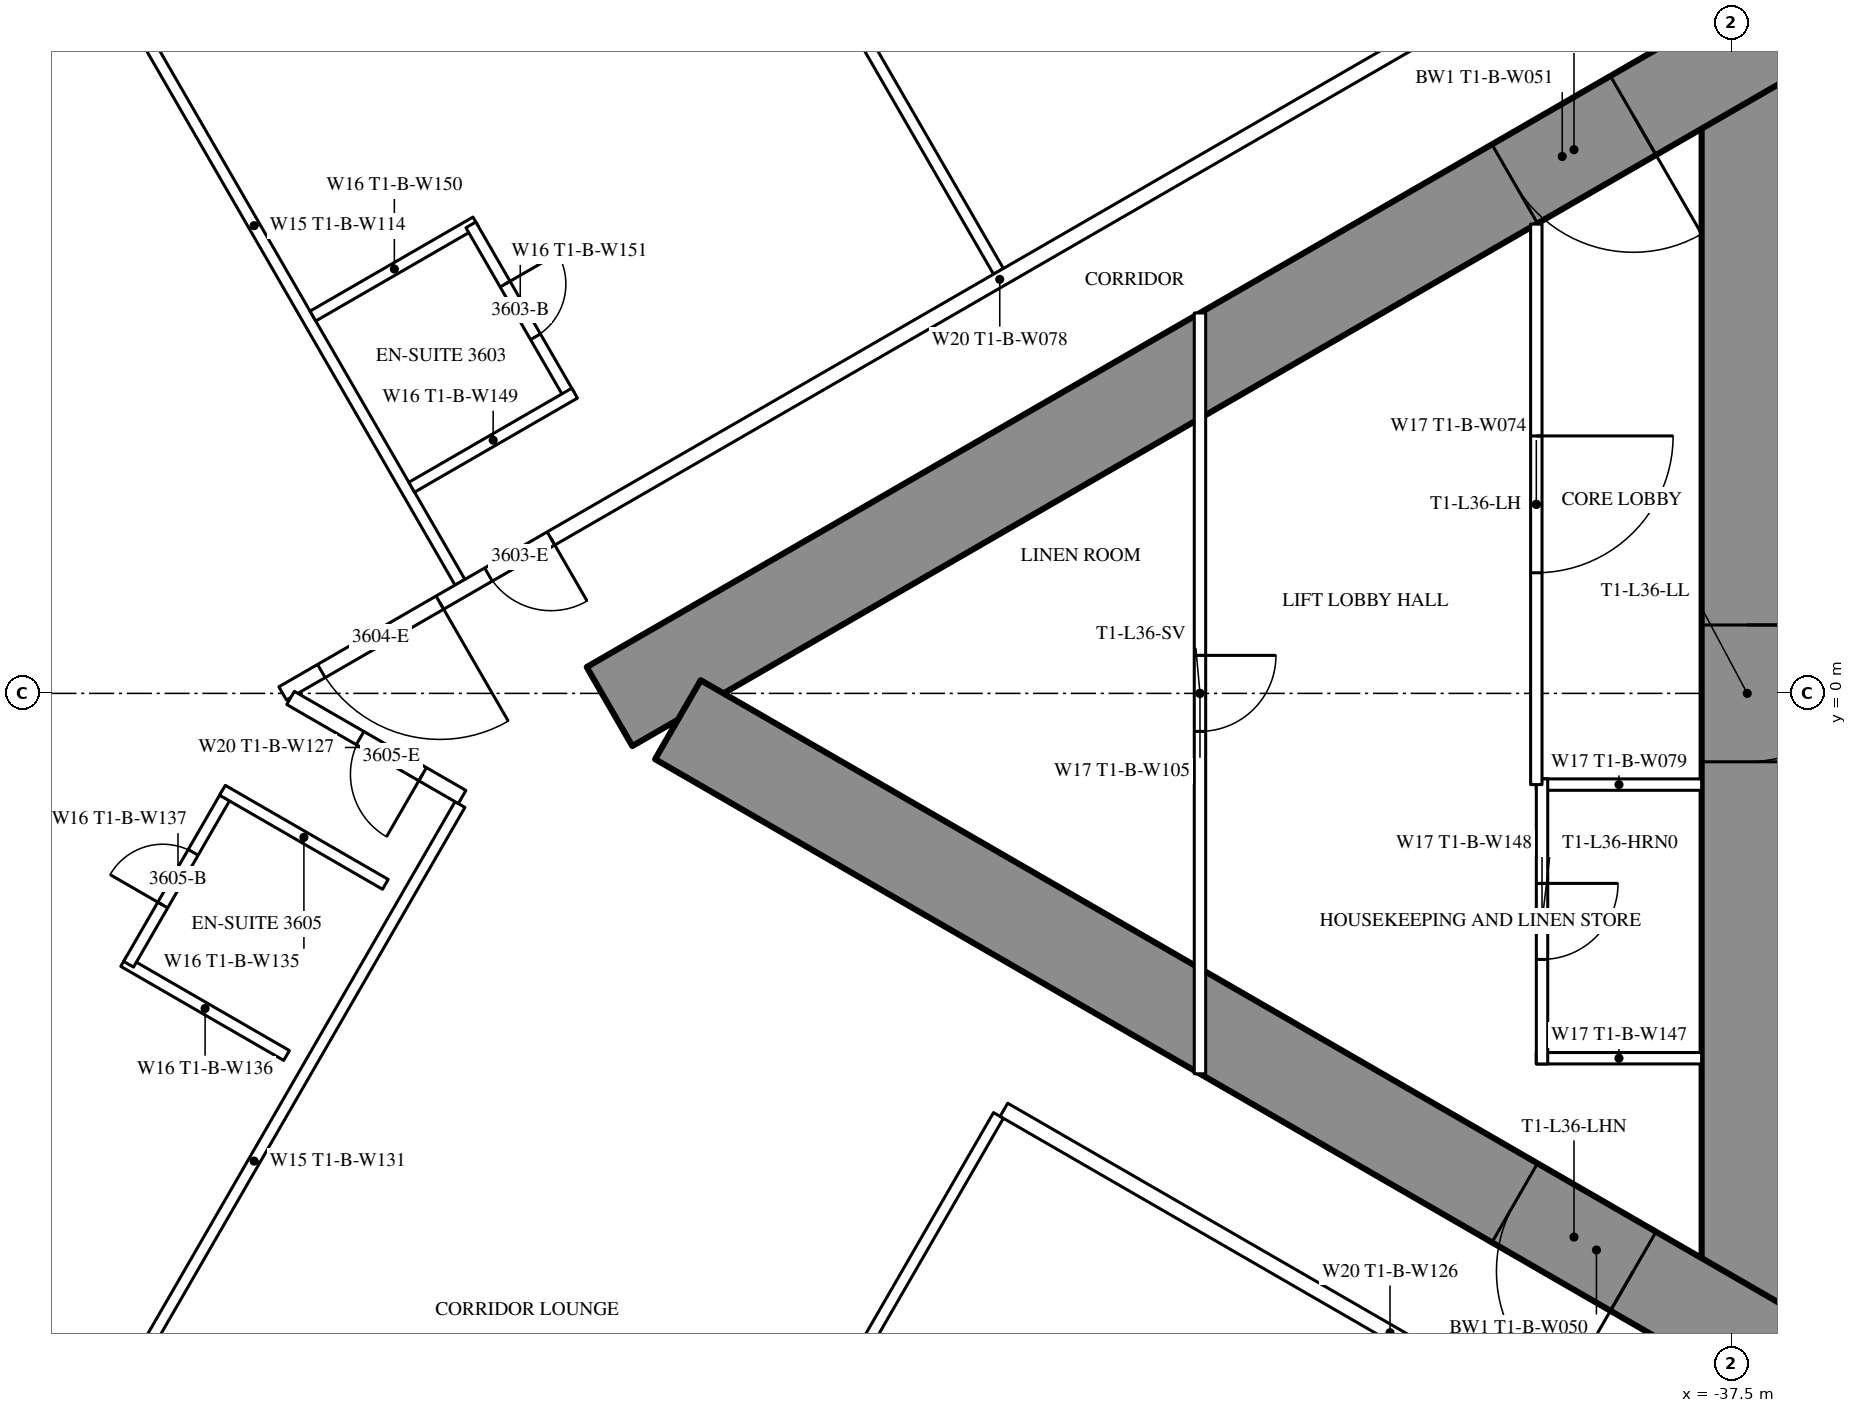
"""IFC4 building model, lengths in metres.
Left out: names, types, materials, properties, quantities, classifications, styles, units other than length and angle.
Written with IfcOpenShell. Run it as: python <this file> out.ifc"""

import sys

from ifc_helpers import new_model, si_unit, direction, frame, frame_2d, origin, place, context, subcontext, project, spatial, rectangle, extrude, element, fill, save


model = new_model("IFC4")
c1 = context("Model", 3, precision=1e-05, world=origin(), true_north=direction((0.0, 1.0)))
c2 = subcontext(c1, "Body", "Model", "MODEL_VIEW")
j1 = project(units=[si_unit("LENGTHUNIT", "METRE"), si_unit("PLANEANGLEUNIT", "RADIAN")], contexts=[c1])
p1 = place(None, origin())
s1 = spatial("IfcSite", under=j1, at=p1, CompositionType="ELEMENT")
p2 = place(p1, origin())
s2 = spatial("IfcBuilding", under=s1, at=p2, CompositionType="ELEMENT")
p3 = place(p2, frame((0.0, 0.0, 136.1)))
s3 = spatial("IfcBuildingStorey", under=s2, at=p3, CompositionType="ELEMENT", Elevation=136.1)
p4 = place(p3, frame((-37.3, 8.6, 0.0), z_axis=(0.0, 0.0, 1.0), x_axis=(0.0, -1.0, 0.0)))
e1 = element("IfcWall", 1, at=p4, inside=s3, PredefinedType="SHEAR", context=c2, shape_type="SweptSolid", body=[
    extrude(rectangle(XDim=17.2, YDim=1.2, at=frame_2d((8.6, 0.0))), origin(), (0.0, 0.0, 1.0), 3.5),
])
p5 = place(p4, frame((7.7, 0.0, 0.0)))
e2 = element("IfcOpeningElement", 2, at=p5, cuts=e1, PredefinedType="OPENING", context=c2, shape_type="SweptSolid", body=[
    extrude(rectangle(XDim=1.8, YDim=2.2, at=frame_2d((0.9, 1.1))), frame((0.0, 0.61, 0.0), z_axis=(0.0, -1.0, 0.0), x_axis=(1.0, 0.0, 0.0)), (0.0, 0.0, 1.0), 1.22),
])
p6 = place(p3, frame((-27.2, 14.3, 0.0), z_axis=(0.0, 0.0, 1.0), x_axis=(-0.866026593062, -0.499997940104, 0.0)))
e3 = element("IfcWall", 3, at=p6, inside=s3, PredefinedType="SHEAR", context=c2, shape_type="SweptSolid", body=[
    extrude(rectangle(XDim=28.946, YDim=1.2, at=frame_2d((14.473, 0.0))), origin(), (0.0, 0.0, 1.0), 3.5),
])
p7 = place(p6, frame((4.6, 0.0, 0.0)))
e4 = element("IfcOpeningElement", 4, at=p7, cuts=e3, PredefinedType="OPENING", context=c2, shape_type="SweptSolid", body=[
    extrude(rectangle(XDim=1.0, YDim=2.2, at=frame_2d((0.5, 1.1))), frame((0.0, 0.61, 0.0), z_axis=(0.0, -1.0, 0.0), x_axis=(1.0, 0.0, 0.0)), (0.0, 0.0, 1.0), 1.22),
])
p8 = place(p6, frame((13.395, 0.0, 0.0)))
e5 = element("IfcOpeningElement", 5, at=p8, cuts=e3, PredefinedType="OPENING", context=c2, shape_type="SweptSolid", body=[
    extrude(rectangle(XDim=1.8, YDim=2.2, at=frame_2d((0.9, 1.1))), frame((0.0, 0.61, 0.0), z_axis=(0.0, -1.0, 0.0), x_axis=(1.0, 0.0, 0.0)), (0.0, 0.0, 1.0), 1.22),
])
p9 = place(p3, frame((-27.2, -14.3, 0.0), z_axis=(0.0, 0.0, 1.0), x_axis=(-0.866024021859, 0.500002393557, 0.0)))
e6 = element("IfcWall", 6, at=p9, inside=s3, PredefinedType="SHEAR", context=c2, shape_type="SweptSolid", body=[
    extrude(rectangle(XDim=27.907, YDim=1.2, at=frame_2d((13.954, 0.0))), origin(), (0.0, 0.0, 1.0), 3.5),
])
p10 = place(p9, frame((4.6, 0.0, 0.0)))
e7 = element("IfcOpeningElement", 7, at=p10, cuts=e6, PredefinedType="OPENING", context=c2, shape_type="SweptSolid", body=[
    extrude(rectangle(XDim=1.0, YDim=2.2, at=frame_2d((0.5, 1.1))), frame((0.0, 0.61, 0.0), z_axis=(0.0, -1.0, 0.0), x_axis=(1.0, 0.0, 0.0)), (0.0, 0.0, 1.0), 1.22),
])
p11 = place(p9, frame((13.395, 0.0, 0.0)))
e8 = element("IfcOpeningElement", 8, at=p11, cuts=e6, PredefinedType="OPENING", context=c2, shape_type="SweptSolid", body=[
    extrude(rectangle(XDim=1.8, YDim=2.2, at=frame_2d((0.9, 1.1))), frame((0.0, 0.61, 0.0), z_axis=(0.0, -1.0, 0.0), x_axis=(1.0, 0.0, 0.0)), (0.0, 0.0, 1.0), 1.22),
])
p12 = place(p3, frame((-47.151, 5.552, 0.0), z_axis=(0.0, 0.0, 1.0), x_axis=(-0.500003012045, 0.866023664773, 0.0)))
e9 = element("IfcWall", 9, at=p12, inside=s3, PredefinedType="PARTITIONING", context=c2, shape_type="SweptSolid", body=[
    extrude(rectangle(XDim=8.311, YDim=0.15, at=frame_2d((4.156, 0.0))), origin(), (0.0, 0.0, 1.0), 2.2),
])
p13 = place(p3, frame((-54.236, 1.462, 0.0), z_axis=(0.0, 0.0, 1.0), x_axis=(-0.499990351854, 0.866030974073, 0.0)))
e10 = element("IfcWall", 10, at=p13, inside=s3, PredefinedType="PARTITIONING", context=c2, shape_type="SweptSolid", body=[
    extrude(rectangle(XDim=10.834, YDim=0.15, at=frame_2d((5.417, 0.0))), origin(), (0.0, 0.0, 1.0), 3.25),
])
p14 = place(p3, frame((-47.151, -5.552, 0.0), z_axis=(0.0, 0.0, 1.0), x_axis=(-0.500003012045, -0.866023664773, 0.0)))
e11 = element("IfcWall", 11, at=p14, inside=s3, PredefinedType="PARTITIONING", context=c2, shape_type="SweptSolid", body=[
    extrude(rectangle(XDim=8.311, YDim=0.15, at=frame_2d((4.156, 0.0))), origin(), (0.0, 0.0, 1.0), 2.2),
])
p15 = place(p3, frame((-54.236, -1.462, 0.0), z_axis=(0.0, 0.0, 1.0), x_axis=(-0.499990351854, -0.866030974073, 0.0)))
e12 = element("IfcWall", 12, at=p15, inside=s3, PredefinedType="PARTITIONING", context=c2, shape_type="SweptSolid", body=[
    extrude(rectangle(XDim=10.834, YDim=0.15, at=frame_2d((5.417, 0.0))), origin(), (0.0, 0.0, 1.0), 3.25),
])
p16 = place(p3, frame((-37.7, 10.894, 0.0), z_axis=(0.0, 0.0, 1.0), x_axis=(-0.866027905338, -0.499995667157, 0.0)))
e13 = element("IfcWall", 13, at=p16, inside=s3, PredefinedType="PARTITIONING", context=c2, shape_type="SweptSolid", body=[
    extrude(rectangle(XDim=21.787, YDim=0.2, at=frame_2d((10.894, 0.0))), origin(), (0.0, 0.0, 1.0), 3.25),
])
p17 = place(p16, frame((17.711, 0.0, 0.0)))
e14 = element("IfcOpeningElement", 14, at=p17, cuts=e13, PredefinedType="OPENING", context=c2, shape_type="SweptSolid", body=[
    extrude(rectangle(XDim=0.95, YDim=2.2, at=frame_2d((0.475, 1.1))), frame((0.0, 0.11, 0.0), z_axis=(0.0, -1.0, 0.0), x_axis=(1.0, 0.0, 0.0)), (0.0, 0.0, 1.0), 0.22),
])
p18 = place(p16, frame((19.399, 0.0, 0.0)))
e15 = element("IfcOpeningElement", 15, at=p18, cuts=e13, PredefinedType="OPENING", context=c2, shape_type="SweptSolid", body=[
    extrude(rectangle(XDim=1.8, YDim=2.2, at=frame_2d((0.9, 1.1))), frame((0.0, 0.11, 0.0), z_axis=(0.0, -1.0, 0.0), x_axis=(1.0, 0.0, 0.0)), (0.0, 0.0, 1.0), 0.22),
])
p19 = place(p16, frame((0.6, 0.0, 0.0)))
e16 = element("IfcOpeningElement", 16, at=p19, cuts=e13, PredefinedType="OPENING", context=c2, shape_type="SweptSolid", body=[
    extrude(rectangle(XDim=0.95, YDim=2.2, at=frame_2d((0.475, 1.1))), frame((0.0, 0.11, 0.0), z_axis=(0.0, -1.0, 0.0), x_axis=(1.0, 0.0, 0.0)), (0.0, 0.0, 1.0), 0.22),
])
p20 = place(p3, frame((-36.92, -11.344, 0.0), z_axis=(0.0, 0.0, 1.0), x_axis=(-0.866027897759, 0.499995680284, 0.0)))
e17 = element("IfcWall", 17, at=p20, inside=s3, PredefinedType="PARTITIONING", context=c2, shape_type="SweptSolid", body=[
    extrude(rectangle(XDim=11.731, YDim=0.2, at=frame_2d((5.865, 0.0))), origin(), (0.0, 0.0, 1.0), 3.25),
])
p21 = place(p20, frame((3.35, 0.0, 0.0)))
e18 = element("IfcOpeningElement", 18, at=p21, cuts=e17, PredefinedType="OPENING", context=c2, shape_type="SweptSolid", body=[
    extrude(rectangle(XDim=1.0, YDim=2.2, at=frame_2d((0.5, 1.1))), frame((0.0, 0.11, 0.0), z_axis=(0.0, -1.0, 0.0), x_axis=(1.0, 0.0, 0.0)), (0.0, 0.0, 1.0), 0.22),
])
p22 = place(p3, frame((-54.207, -1.363, 0.0), z_axis=(0.0, 0.0, 1.0), x_axis=(-0.866049872286, 0.499957616916, 0.0)))
e19 = element("IfcWall", 19, at=p22, inside=s3, PredefinedType="PARTITIONING", context=c2, shape_type="SweptSolid", body=[
    extrude(rectangle(XDim=2.606, YDim=0.2, at=frame_2d((1.303, 0.0))), origin(), (0.0, 0.0, 1.0), 3.25),
])
p23 = place(p22, frame((0.6, 0.0, 0.0)))
e20 = element("IfcOpeningElement", 20, at=p23, cuts=e19, PredefinedType="OPENING", context=c2, shape_type="SweptSolid", body=[
    extrude(rectangle(XDim=0.95, YDim=2.2, at=frame_2d((0.475, 1.1))), frame((0.0, 0.11, 0.0), z_axis=(0.0, -1.0, 0.0), x_axis=(1.0, 0.0, 0.0)), (0.0, 0.0, 1.0), 0.22),
])
p24 = place(p3, frame((-54.027, 6.201, 0.0), z_axis=(0.0, 0.0, 1.0), x_axis=(-0.866006523861, -0.500032699561, 0.0)))
e21 = element("IfcWall", 21, at=p24, inside=s3, PredefinedType="PARTITIONING", context=c2, shape_type="SweptSolid", body=[
    extrude(rectangle(XDim=2.475, YDim=0.15, at=frame_2d((1.237, 0.0))), origin(), (0.0, 0.0, 1.0), 3.25),
])
p25 = place(p3, frame((-52.792, 3.912, 0.0), z_axis=(0.0, 0.0, 1.0), x_axis=(-0.500006934395, 0.866021400173, 0.0)))
e22 = element("IfcWall", 22, at=p25, inside=s3, PredefinedType="PARTITIONING", context=c2, shape_type="SweptSolid", body=[
    extrude(rectangle(XDim=2.6, YDim=0.15, at=frame_2d((1.3, 0.0))), origin(), (0.0, 0.0, 1.0), 3.25),
])
p26 = place(p25, frame((0.9, 0.0, 0.0)))
e23 = element("IfcOpeningElement", 23, at=p26, cuts=e22, PredefinedType="OPENING", context=c2, shape_type="SweptSolid", body=[
    extrude(rectangle(XDim=0.8, YDim=2.2, at=frame_2d((0.4, 1.1))), frame((0.0, 0.085, 0.0), z_axis=(0.0, -1.0, 0.0), x_axis=(1.0, 0.0, 0.0)), (0.0, 0.0, 1.0), 0.17),
])
p27 = place(p3, frame((-52.727, 3.95, 0.0), z_axis=(0.0, 0.0, 1.0), x_axis=(-0.866006523861, -0.500032699561, 0.0)))
e24 = element("IfcWall", 24, at=p27, inside=s3, PredefinedType="PARTITIONING", context=c2, shape_type="SweptSolid", body=[
    extrude(rectangle(XDim=2.475, YDim=0.15, at=frame_2d((1.237, 0.0))), origin(), (0.0, 0.0, 1.0), 3.25),
])
p28 = place(p3, frame((-56.517, -4.764, 0.0), z_axis=(0.0, 0.0, 1.0), x_axis=(-0.866031185235, 0.4999899861, 0.0)))
e25 = element("IfcWall", 25, at=p28, inside=s3, PredefinedType="PARTITIONING", context=c2, shape_type="SweptSolid", body=[
    extrude(rectangle(XDim=2.475, YDim=0.15, at=frame_2d((1.238, 0.0))), origin(), (0.0, 0.0, 1.0), 3.25),
])
p29 = place(p3, frame((-57.296, -1.312, 0.0), z_axis=(0.0, 0.0, 1.0), x_axis=(-0.49997716683, -0.86603858612, 0.0)))
e26 = element("IfcWall", 26, at=p29, inside=s3, PredefinedType="PARTITIONING", context=c2, shape_type="SweptSolid", body=[
    extrude(rectangle(XDim=2.6, YDim=0.15, at=frame_2d((1.3, 0.0))), origin(), (0.0, 0.0, 1.0), 3.25),
])
p30 = place(p29, frame((0.9, 0.0, 0.0)))
e27 = element("IfcOpeningElement", 27, at=p30, cuts=e26, PredefinedType="OPENING", context=c2, shape_type="SweptSolid", body=[
    extrude(rectangle(XDim=0.8, YDim=2.2, at=frame_2d((0.4, 1.1))), frame((0.0, 0.085, 0.0), z_axis=(0.0, -1.0, 0.0), x_axis=(1.0, 0.0, 0.0)), (0.0, 0.0, 1.0), 0.17),
])
p31 = place(p3, frame((-55.217, -2.512, 0.0), z_axis=(0.0, 0.0, 1.0), x_axis=(-0.866031185235, 0.4999899861, 0.0)))
e28 = element("IfcWall", 28, at=p31, inside=s3, PredefinedType="PARTITIONING", context=c2, shape_type="SweptSolid", body=[
    extrude(rectangle(XDim=2.475, YDim=0.15, at=frame_2d((1.238, 0.0))), origin(), (0.0, 0.0, 1.0), 3.25),
])
for number, where, z_axis, x_axis in (
    (29, (-37.9, -1.2, 0.0), (0.0, 0.0, 1.0), (-1.0, 0.0, 0.0)),
    (30, (-37.9, -4.8, 0.0), (0.0, 0.0, 1.0), (-1.0, 0.0, 0.0)),
):
    element("IfcWall", number, at=place(p3, frame(where, z_axis=z_axis, x_axis=x_axis)), inside=s3, PredefinedType="PARTITIONING", context=c2, shape_type="SweptSolid", body=[
        extrude(rectangle(XDim=2.175, YDim=0.15, at=frame_2d((1.087, 0.0))), origin(), (0.0, 0.0, 1.0), 3.25),
    ])
p32 = place(p3, frame((-40.0, -1.125, 0.0), z_axis=(0.0, 0.0, 1.0), x_axis=(0.0, -1.0, 0.0)))
e31 = element("IfcWall", 31, at=p32, inside=s3, PredefinedType="PARTITIONING", context=c2, shape_type="SweptSolid", body=[
    extrude(rectangle(XDim=3.75, YDim=0.15, at=frame_2d((1.875, 0.0))), origin(), (0.0, 0.0, 1.0), 3.25),
])
p33 = place(p32, frame((1.375, 0.0, 0.0)))
e32 = element("IfcOpeningElement", 32, at=p33, cuts=e31, PredefinedType="OPENING", context=c2, shape_type="SweptSolid", body=[
    extrude(rectangle(XDim=1.0, YDim=2.2, at=frame_2d((0.5, 1.1))), frame((0.0, 0.085, 0.0), z_axis=(0.0, -1.0, 0.0), x_axis=(1.0, 0.0, 0.0)), (0.0, 0.0, 1.0), 0.17),
])
p34 = place(p3, frame((-40.075, 6.174, 0.0), z_axis=(0.0, 0.0, 1.0), x_axis=(0.0, -1.0, 0.0)))
e33 = element("IfcWall", 33, at=p34, inside=s3, PredefinedType="PARTITIONING", context=c2, shape_type="SweptSolid", body=[
    extrude(rectangle(XDim=7.374, YDim=0.15, at=frame_2d((3.687, 0.0))), origin(), (0.0, 0.0, 1.0), 3.25),
])
p35 = place(p34, frame((2.787, 0.0, 0.0)))
e34 = element("IfcOpeningElement", 34, at=p35, cuts=e33, PredefinedType="OPENING", context=c2, shape_type="SweptSolid", body=[
    extrude(rectangle(XDim=1.8, YDim=2.2, at=frame_2d((0.9, 1.1))), frame((0.0, 0.085, 0.0), z_axis=(0.0, -1.0, 0.0), x_axis=(1.0, 0.0, 0.0)), (0.0, 0.0, 1.0), 0.17),
])
p36 = place(p3, frame((-44.5, 5.005, 0.0), z_axis=(0.0, 0.0, 1.0), x_axis=(0.0, -1.0, 0.0)))
e35 = element("IfcWall", 35, at=p36, inside=s3, PredefinedType="PARTITIONING", context=c2, shape_type="SweptSolid", body=[
    extrude(rectangle(XDim=10.009, YDim=0.15, at=frame_2d((5.005, 0.0))), origin(), (0.0, 0.0, 1.0), 2.45),
])
p37 = place(p36, frame((4.505, 0.0, 0.0)))
e36 = element("IfcOpeningElement", 36, at=p37, cuts=e35, PredefinedType="OPENING", context=c2, shape_type="SweptSolid", body=[
    extrude(rectangle(XDim=1.0, YDim=2.2, at=frame_2d((0.5, 1.1))), frame((0.0, 0.085, 0.0), z_axis=(0.0, -1.0, 0.0), x_axis=(1.0, 0.0, 0.0)), (0.0, 0.0, 1.0), 0.17),
])
p38 = place(p26, origin())
e37 = element("IfcDoor", 37, at=p38, inside=s3, OperationType="SINGLE_SWING_RIGHT", PredefinedType="DOOR", context=c2, shape_type="SweptSolid", body=[
    extrude(rectangle(XDim=0.8, YDim=2.2, at=frame_2d((0.4, 1.1))), frame((0.0, 0.025, 0.0), z_axis=(0.0, -1.0, 0.0), x_axis=(1.0, 0.0, 0.0)), (0.0, 0.0, 1.0), 0.05),
])
fill(e23, e37)
p39 = place(p17, origin())
e38 = element("IfcDoor", 38, at=p39, inside=s3, OperationType="SINGLE_SWING_LEFT", PredefinedType="DOOR", context=c2, shape_type="SweptSolid", body=[
    extrude(rectangle(XDim=0.95, YDim=2.2, at=frame_2d((0.475, 1.1))), frame((0.0, 0.025, 0.0), z_axis=(0.0, -1.0, 0.0), x_axis=(1.0, 0.0, 0.0)), (0.0, 0.0, 1.0), 0.05),
])
fill(e14, e38)
p40 = place(p18, origin())
e39 = element("IfcDoor", 39, at=p40, inside=s3, OperationType="DOUBLE_DOOR_SINGLE_SWING", PredefinedType="DOOR", context=c2, shape_type="SweptSolid", body=[
    extrude(rectangle(XDim=1.8, YDim=2.2, at=frame_2d((0.9, 1.1))), frame((0.0, 0.025, 0.0), z_axis=(0.0, -1.0, 0.0), x_axis=(1.0, 0.0, 0.0)), (0.0, 0.0, 1.0), 0.05),
])
fill(e15, e39)
p41 = place(p30, origin())
e40 = element("IfcDoor", 40, at=p41, inside=s3, OperationType="SINGLE_SWING_RIGHT", PredefinedType="DOOR", context=c2, shape_type="SweptSolid", body=[
    extrude(rectangle(XDim=0.8, YDim=2.2, at=frame_2d((0.4, 1.1))), frame((0.0, 0.025, 0.0), z_axis=(0.0, -1.0, 0.0), x_axis=(1.0, 0.0, 0.0)), (0.0, 0.0, 1.0), 0.05),
])
fill(e27, e40)
p42 = place(p23, origin())
e41 = element("IfcDoor", 41, at=p42, inside=s3, OperationType="SINGLE_SWING_LEFT", PredefinedType="DOOR", context=c2, shape_type="SweptSolid", body=[
    extrude(rectangle(XDim=0.95, YDim=2.2, at=frame_2d((0.475, 1.1))), frame((0.0, 0.025, 0.0), z_axis=(0.0, -1.0, 0.0), x_axis=(1.0, 0.0, 0.0)), (0.0, 0.0, 1.0), 0.05),
])
fill(e20, e41)
p43 = place(p33, origin())
e42 = element("IfcDoor", 42, at=p43, inside=s3, OperationType="SINGLE_SWING_LEFT", PredefinedType="DOOR", context=c2, shape_type="SweptSolid", body=[
    extrude(rectangle(XDim=1.0, YDim=2.2, at=frame_2d((0.5, 1.1))), frame((0.0, 0.025, 0.0), z_axis=(0.0, -1.0, 0.0), x_axis=(1.0, 0.0, 0.0)), (0.0, 0.0, 1.0), 0.05),
])
fill(e32, e42)
p44 = place(p35, origin())
e43 = element("IfcDoor", 43, at=p44, inside=s3, OperationType="DOUBLE_DOOR_SINGLE_SWING", PredefinedType="DOOR", context=c2, shape_type="SweptSolid", body=[
    extrude(rectangle(XDim=1.8, YDim=2.2, at=frame_2d((0.9, 1.1))), frame((0.0, 0.025, 0.0), z_axis=(0.0, -1.0, 0.0), x_axis=(1.0, 0.0, 0.0)), (0.0, 0.0, 1.0), 0.05),
])
fill(e34, e43)
p45 = place(p37, origin())
e44 = element("IfcDoor", 44, at=p45, inside=s3, OperationType="SINGLE_SWING_LEFT", PredefinedType="DOOR", context=c2, shape_type="SweptSolid", body=[
    extrude(rectangle(XDim=1.0, YDim=2.2, at=frame_2d((0.5, 1.1))), frame((0.0, 0.025, 0.0), z_axis=(0.0, -1.0, 0.0), x_axis=(1.0, 0.0, 0.0)), (0.0, 0.0, 1.0), 0.05),
])
fill(e36, e44)
p46 = place(p8, origin())
e45 = element("IfcDoor", 45, at=p46, inside=s3, OperationType="DOUBLE_DOOR_SINGLE_SWING", PredefinedType="DOOR", context=c2, shape_type="SweptSolid", body=[
    extrude(rectangle(XDim=1.8, YDim=2.2, at=frame_2d((0.9, 1.1))), frame((0.0, 0.025, 0.0), z_axis=(0.0, -1.0, 0.0), x_axis=(1.0, 0.0, 0.0)), (0.0, 0.0, 1.0), 0.05),
])
fill(e5, e45)
p47 = place(p11, origin())
e46 = element("IfcDoor", 46, at=p47, inside=s3, OperationType="DOUBLE_DOOR_SINGLE_SWING", PredefinedType="DOOR", context=c2, shape_type="SweptSolid", body=[
    extrude(rectangle(XDim=1.8, YDim=2.2, at=frame_2d((0.9, 1.1))), frame((0.0, 0.025, 0.0), z_axis=(0.0, -1.0, 0.0), x_axis=(1.0, 0.0, 0.0)), (0.0, 0.0, 1.0), 0.05),
])
fill(e8, e46)
p48 = place(p5, origin())
e47 = element("IfcDoor", 47, at=p48, inside=s3, OperationType="DOUBLE_DOOR_SINGLE_SWING", PredefinedType="DOOR", context=c2, shape_type="SweptSolid", body=[
    extrude(rectangle(XDim=1.8, YDim=2.2, at=frame_2d((0.9, 1.1))), frame((0.0, 0.025, 0.0), z_axis=(0.0, -1.0, 0.0), x_axis=(1.0, 0.0, 0.0)), (0.0, 0.0, 1.0), 0.05),
])
fill(e2, e47)
save(model, sys.argv[1])
